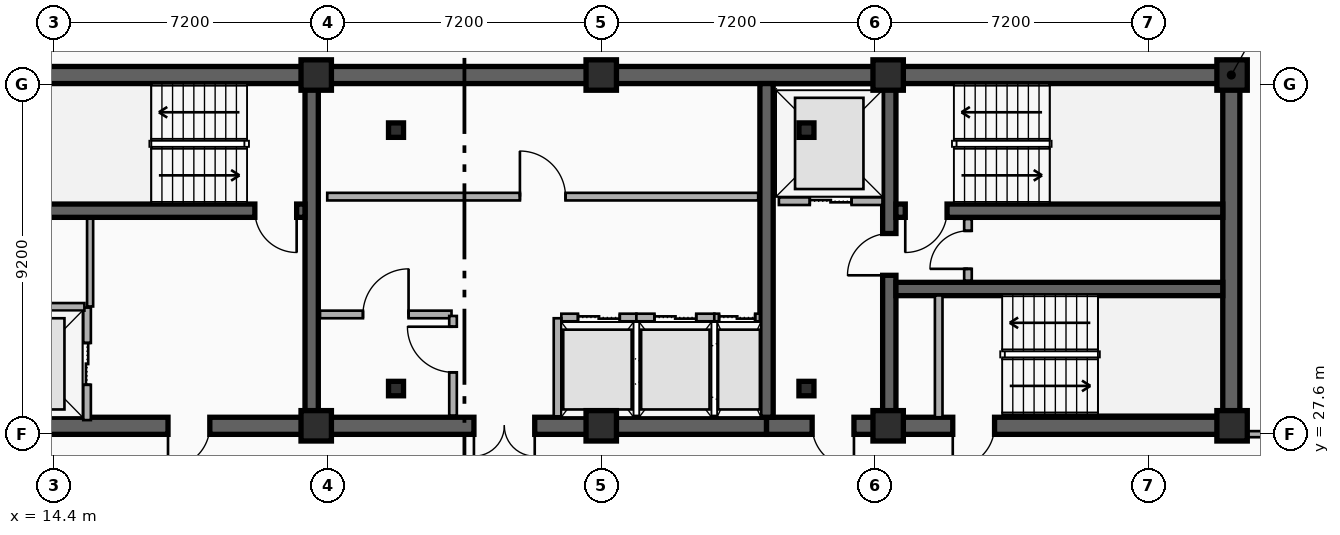
"""IFC4 building model, lengths in metres.
Left out: names, types, materials, properties, quantities, classifications, styles, units other than length and angle.
Written with IfcOpenShell. Run it as: python <this file> out.ifc"""

import sys

from ifc_helpers import new_model, si_unit, direction, frame, frame_2d, origin, origin_2d, place, context, subcontext, project, spatial, rectangle, i_section, extrude, element, fill, save


model = new_model("IFC4")
c1 = context("Model", 3, precision=1e-05, world=origin(), true_north=direction((0.0, 1.0)))
c2 = subcontext(c1, "Body", "Model", "MODEL_VIEW")
j1 = project(units=[si_unit("LENGTHUNIT", "METRE"), si_unit("PLANEANGLEUNIT", "RADIAN")], contexts=[c1])
p1 = place(None, origin())
s1 = spatial("IfcSite", under=j1, at=p1, CompositionType="ELEMENT")
p2 = place(p1, origin())
s2 = spatial("IfcBuilding", under=s1, at=p2, CompositionType="ELEMENT")
p3 = place(p2, frame((0.0, 0.0, 258.4)))
s3 = spatial("IfcBuildingStorey", under=s2, at=p3, CompositionType="ELEMENT", Elevation=258.4)
p4 = place(p3, frame((12.15, 37.05, 0.0), z_axis=(0.0, 0.0, 1.0), x_axis=(1.0, 0.0, 0.0)))
e1 = element("IfcWall", 1, at=p4, inside=s3, PredefinedType="SHEAR", context=c2, shape_type="SweptSolid", body=[
    extrude(rectangle(XDim=33.23, YDim=0.45, at=frame_2d((16.615, 0.0))), origin(), (0.0, 0.0, 1.0), 3.7),
])
p5 = place(p3, frame((21.18, 27.82, 0.0), z_axis=(0.0, 0.0, 1.0), x_axis=(-1.0, 0.0, 0.0)))
e2 = element("IfcWall", 2, at=p5, inside=s3, PredefinedType="SHEAR", context=c2, shape_type="SweptSolid", body=[
    extrude(rectangle(XDim=9.03, YDim=0.45, at=frame_2d((4.515, 0.0))), origin(), (0.0, 0.0, 1.0), 3.7),
])
p6 = place(p5, frame((2.68, 0.0, 0.0)))
e3 = element("IfcOpeningElement", 3, at=p6, cuts=e2, PredefinedType="OPENING", context=c2, shape_type="SweptSolid", body=[
    extrude(rectangle(XDim=1.1, YDim=2.15, at=frame_2d((0.55, 1.075))), frame((0.0, 0.235, 0.0), z_axis=(0.0, -1.0, 0.0), x_axis=(1.0, 0.0, 0.0)), (0.0, 0.0, 1.0), 0.47),
])
p7 = place(p3, frame((33.15, 27.82, 0.0), z_axis=(0.0, 0.0, 1.0), x_axis=(-1.0, 0.0, 0.0)))
e4 = element("IfcWall", 4, at=p7, inside=s3, PredefinedType="SHEAR", context=c2, shape_type="SweptSolid", body=[
    extrude(rectangle(XDim=11.97, YDim=0.45, at=frame_2d((5.985, 0.0))), origin(), (0.0, 0.0, 1.0), 3.7),
])
p8 = place(p7, frame((6.1, 0.0, 0.0)))
e5 = element("IfcOpeningElement", 5, at=p8, cuts=e4, PredefinedType="OPENING", context=c2, shape_type="SweptSolid", body=[
    extrude(rectangle(XDim=1.6, YDim=2.2, at=frame_2d((0.8, 1.1))), frame((0.0, 0.235, 0.0), z_axis=(0.0, -1.0, 0.0), x_axis=(1.0, 0.0, 0.0)), (0.0, 0.0, 1.0), 0.47),
])
p9 = place(p3, frame((45.38, 27.82, 0.0), z_axis=(0.0, 0.0, 1.0), x_axis=(-1.0, 0.0, 0.0)))
e6 = element("IfcWall", 6, at=p9, inside=s3, PredefinedType="SHEAR", context=c2, shape_type="SweptSolid", body=[
    extrude(rectangle(XDim=12.23, YDim=0.45, at=frame_2d((6.115, 0.0))), origin(), (0.0, 0.0, 1.0), 3.7),
])
p10 = place(p9, frame((9.93, 0.0, 0.0)))
e7 = element("IfcOpeningElement", 7, at=p10, cuts=e6, PredefinedType="OPENING", context=c2, shape_type="SweptSolid", body=[
    extrude(rectangle(XDim=1.1, YDim=2.15, at=frame_2d((0.55, 1.075))), frame((0.0, 0.235, 0.0), z_axis=(0.0, -1.0, 0.0), x_axis=(1.0, 0.0, 0.0)), (0.0, 0.0, 1.0), 0.47),
])
p11 = place(p9, frame((6.23, 0.0, 0.0)))
e8 = element("IfcOpeningElement", 8, at=p11, cuts=e6, PredefinedType="OPENING", context=c2, shape_type="SweptSolid", body=[
    extrude(rectangle(XDim=1.1, YDim=2.15, at=frame_2d((0.55, 1.075))), frame((0.0, 0.235, 0.0), z_axis=(0.0, -1.0, 0.0), x_axis=(1.0, 0.0, 0.0)), (0.0, 0.0, 1.0), 0.47),
])
p12 = place(p3, frame((45.38, 28.045, 0.0), z_axis=(0.0, 0.0, 1.0), x_axis=(0.0, 1.0, 0.0)))
e9 = element("IfcWall", 9, at=p12, inside=s3, PredefinedType="SHEAR", context=c2, shape_type="SweptSolid", body=[
    extrude(rectangle(XDim=8.78, YDim=0.45, at=frame_2d((4.39, 0.0))), origin(), (0.0, 0.0, 1.0), 3.7),
])
for number, where, z_axis, x_axis in (
    (10, (21.18, 28.045, 0.0), (0.0, 0.0, 1.0), (0.0, 1.0, 0.0)),
    (11, (33.15, 28.045, 0.0), (0.0, 0.0, 1.0), (0.0, 1.0, 0.0)),
):
    element("IfcWall", number, at=place(p3, frame(where, z_axis=z_axis, x_axis=x_axis)), inside=s3, PredefinedType="SHEAR", context=c2, shape_type="SweptSolid", body=[
        extrude(rectangle(XDim=8.78, YDim=0.35, at=frame_2d((4.39, 0.0))), origin(), (0.0, 0.0, 1.0), 3.7),
    ])
p13 = place(p3, frame((36.38, 28.045, 0.0), z_axis=(0.0, 0.0, 1.0), x_axis=(0.0, 1.0, 0.0)))
e12 = element("IfcWall", 12, at=p13, inside=s3, PredefinedType="SHEAR", context=c2, shape_type="SweptSolid", body=[
    extrude(rectangle(XDim=8.78, YDim=0.35, at=frame_2d((4.39, 0.0))), origin(), (0.0, 0.0, 1.0), 3.7),
])
p14 = place(p13, frame((3.735, 0.0, 0.0)))
e13 = element("IfcOpeningElement", 13, at=p14, cuts=e12, PredefinedType="OPENING", context=c2, shape_type="SweptSolid", body=[
    extrude(rectangle(XDim=1.1, YDim=2.15, at=frame_2d((0.55, 1.075))), frame((0.0, 0.185, 0.0), z_axis=(0.0, -1.0, 0.0), x_axis=(1.0, 0.0, 0.0)), (0.0, 0.0, 1.0), 0.37),
])
p15 = place(p3, frame((21.005, 33.48, 0.0), z_axis=(0.0, 0.0, 1.0), x_axis=(-1.0, 0.0, 0.0)))
e14 = element("IfcWall", 14, at=p15, inside=s3, PredefinedType="SHEAR", context=c2, shape_type="SweptSolid", body=[
    extrude(rectangle(XDim=8.63, YDim=0.35, at=frame_2d((4.315, 0.0))), origin(), (0.0, 0.0, 1.0), 3.7),
])
p16 = place(p15, frame((0.22, 0.0, 0.0)))
e15 = element("IfcOpeningElement", 15, at=p16, cuts=e14, PredefinedType="OPENING", context=c2, shape_type="SweptSolid", body=[
    extrude(rectangle(XDim=1.1, YDim=2.15, at=frame_2d((0.55, 1.075))), frame((0.0, 0.185, 0.0), z_axis=(0.0, -1.0, 0.0), x_axis=(1.0, 0.0, 0.0)), (0.0, 0.0, 1.0), 0.37),
])
p17 = place(p3, frame((45.155, 33.48, 0.0), z_axis=(0.0, 0.0, 1.0), x_axis=(-1.0, 0.0, 0.0)))
e16 = element("IfcWall", 16, at=p17, inside=s3, PredefinedType="SHEAR", context=c2, shape_type="SweptSolid", body=[
    extrude(rectangle(XDim=8.6, YDim=0.35, at=frame_2d((4.3, 0.0))), origin(), (0.0, 0.0, 1.0), 3.7),
])
p18 = place(p17, frame((7.255, 0.0, 0.0)))
e17 = element("IfcOpeningElement", 17, at=p18, cuts=e16, PredefinedType="OPENING", context=c2, shape_type="SweptSolid", body=[
    extrude(rectangle(XDim=1.1, YDim=2.15, at=frame_2d((0.55, 1.075))), frame((0.0, 0.185, 0.0), z_axis=(0.0, -1.0, 0.0), x_axis=(1.0, 0.0, 0.0)), (0.0, 0.0, 1.0), 0.37),
])
p19 = place(p3, frame((36.555, 31.42, 0.0), z_axis=(0.0, 0.0, 1.0), x_axis=(1.0, 0.0, 0.0)))
e18 = element("IfcWall", 18, at=p19, inside=s3, PredefinedType="SHEAR", context=c2, shape_type="SweptSolid", body=[
    extrude(rectangle(XDim=8.6, YDim=0.35, at=frame_2d((4.3, 0.0))), origin(), (0.0, 0.0, 1.0), 3.7),
])
for number, where, z_axis, x_axis in (
    (19, (23.4, 28.8, 0.0), (0.0, 0.0, 1.0), (1.0, 0.0, 0.0)),
    (20, (34.2, 28.8, 0.0), (0.0, 0.0, 1.0), (1.0, 0.0, 0.0)),
    (21, (34.2, 35.6, 0.0), (0.0, 0.0, 1.0), (1.0, 0.0, 0.0)),
    (22, (23.4, 35.6, 0.0), (0.0, 0.0, 1.0), (1.0, 0.0, 0.0)),
):
    element("IfcColumn", number, at=place(p3, frame(where, z_axis=z_axis, x_axis=x_axis)), inside=s3, PredefinedType="COLUMN", context=c2, shape_type="SweptSolid", body=[
        extrude(i_section(OverallWidth=0.395, OverallDepth=0.38, WebThickness=0.019, FlangeThickness=0.03, FilletRadius=0.015, at=origin_2d()), origin(), (0.0, 0.0, 1.0), 3.7),
    ])
for number, where, z_axis, x_axis in (
    (23, (21.3, 27.82, 0.0), (0.0, 0.0, 1.0), (1.0, 0.0, 0.0)),
    (24, (21.3, 37.05, 0.0), (0.0, 0.0, 1.0), (1.0, 0.0, 0.0)),
    (25, (28.8, 27.82, 0.0), (0.0, 0.0, 1.0), (1.0, 0.0, 0.0)),
    (26, (28.8, 37.05, 0.0), (0.0, 0.0, 1.0), (1.0, 0.0, 0.0)),
    (27, (36.35, 27.82, 0.0), (0.0, 0.0, 1.0), (1.0, 0.0, 0.0)),
    (28, (36.35, 37.05, 0.0), (0.0, 0.0, 1.0), (1.0, 0.0, 0.0)),
    (29, (45.4, 27.82, 0.0), (0.0, 0.0, 1.0), (1.0, 0.0, 0.0)),
    (30, (45.4, 37.05, 0.0), (0.0, 0.0, 1.0), (1.0, 0.0, 0.0)),
):
    element("IfcColumn", number, at=place(p3, frame(where, z_axis=z_axis, x_axis=x_axis)), inside=s3, PredefinedType="COLUMN", context=c2, shape_type="SweptSolid", body=[
        extrude(rectangle(XDim=0.8, YDim=0.8, at=origin_2d()), origin(), (0.0, 0.0, 1.0), 3.7),
    ])
p20 = place(p3, frame((15.27, 27.97, 0.0), z_axis=(0.0, 0.0, 1.0), x_axis=(0.0, 1.0, 0.0)))
e31 = element("IfcWall", 31, at=p20, inside=s3, PredefinedType="PARTITIONING", context=c2, shape_type="SweptSolid", body=[
    extrude(rectangle(XDim=2.96, YDim=0.2, at=frame_2d((1.48, 0.0))), origin(), (0.0, 0.0, 1.0), 2.49),
])
p21 = place(p20, frame((0.93, 0.0, 0.0)))
e32 = element("IfcOpeningElement", 32, at=p21, cuts=e31, PredefinedType="OPENING", context=c2, shape_type="SweptSolid", body=[
    extrude(rectangle(XDim=1.1, YDim=2.15, at=frame_2d((0.55, 1.075))), frame((0.0, 0.11, 0.0), z_axis=(0.0, -1.0, 0.0), x_axis=(1.0, 0.0, 0.0)), (0.0, 0.0, 1.0), 0.22),
])
p22 = place(p3, frame((12.45, 30.95, 0.0), z_axis=(0.0, 0.0, 1.0), x_axis=(1.0, 0.0, 0.0)))
e33 = element("IfcWall", 33, at=p22, inside=s3, PredefinedType="PARTITIONING", context=c2, shape_type="SweptSolid", body=[
    extrude(rectangle(XDim=2.75, YDim=0.2, at=frame_2d((1.375, 0.0))), origin(), (0.0, 0.0, 1.0), 2.49),
])
p23 = place(p3, frame((33.475, 33.73, 0.0), z_axis=(0.0, 0.0, 1.0), x_axis=(1.0, 0.0, 0.0)))
e34 = element("IfcWall", 34, at=p23, inside=s3, PredefinedType="PARTITIONING", context=c2, shape_type="SweptSolid", body=[
    extrude(rectangle(XDim=2.725, YDim=0.2, at=frame_2d((1.362, 0.0))), origin(), (0.0, 0.0, 1.0), 2.49),
])
p24 = place(p23, frame((0.812, 0.0, 0.0)))
e35 = element("IfcOpeningElement", 35, at=p24, cuts=e34, PredefinedType="OPENING", context=c2, shape_type="SweptSolid", body=[
    extrude(rectangle(XDim=1.1, YDim=2.15, at=frame_2d((0.55, 1.075))), frame((0.0, 0.11, 0.0), z_axis=(0.0, -1.0, 0.0), x_axis=(1.0, 0.0, 0.0)), (0.0, 0.0, 1.0), 0.22),
])
p25 = place(p3, frame((27.75, 30.67, 0.0), z_axis=(0.0, 0.0, 1.0), x_axis=(1.0, 0.0, 0.0)))
e36 = element("IfcWall", 36, at=p25, inside=s3, PredefinedType="PARTITIONING", context=c2, shape_type="SweptSolid", body=[
    extrude(rectangle(XDim=1.975, YDim=0.2, at=frame_2d((0.988, 0.0))), origin(), (0.0, 0.0, 1.0), 2.49),
])
p26 = place(p25, frame((0.438, 0.0, 0.0)))
e37 = element("IfcOpeningElement", 37, at=p26, cuts=e36, PredefinedType="OPENING", context=c2, shape_type="SweptSolid", body=[
    extrude(rectangle(XDim=1.1, YDim=2.15, at=frame_2d((0.55, 1.075))), frame((0.0, 0.11, 0.0), z_axis=(0.0, -1.0, 0.0), x_axis=(1.0, 0.0, 0.0)), (0.0, 0.0, 1.0), 0.22),
])
p27 = place(p3, frame((27.65, 28.07, 0.0), z_axis=(0.0, 0.0, 1.0), x_axis=(0.0, 1.0, 0.0)))
e38 = element("IfcWall", 38, at=p27, inside=s3, PredefinedType="PARTITIONING", context=c2, shape_type="SweptSolid", body=[
    extrude(rectangle(XDim=2.58, YDim=0.2, at=frame_2d((1.29, 0.0))), origin(), (0.0, 0.0, 1.0), 2.49),
])
p28 = place(p3, frame((29.725, 30.67, 0.0), z_axis=(0.0, 0.0, 1.0), x_axis=(1.0, 0.0, 0.0)))
e39 = element("IfcWall", 39, at=p28, inside=s3, PredefinedType="PARTITIONING", context=c2, shape_type="SweptSolid", body=[
    extrude(rectangle(XDim=2.05, YDim=0.2, at=frame_2d((1.025, 0.0))), origin(), (0.0, 0.0, 1.0), 2.8),
])
p29 = place(p28, frame((0.475, 0.0, 0.0)))
e40 = element("IfcOpeningElement", 40, at=p29, cuts=e39, PredefinedType="OPENING", context=c2, shape_type="SweptSolid", body=[
    extrude(rectangle(XDim=1.1, YDim=2.15, at=frame_2d((0.55, 1.075))), frame((0.0, 0.11, 0.0), z_axis=(0.0, -1.0, 0.0), x_axis=(1.0, 0.0, 0.0)), (0.0, 0.0, 1.0), 0.22),
])
p30 = place(p3, frame((31.775, 30.67, 0.0), z_axis=(0.0, 0.0, 1.0), x_axis=(1.0, 0.0, 0.0)))
e41 = element("IfcWall", 41, at=p30, inside=s3, PredefinedType="PARTITIONING", context=c2, shape_type="SweptSolid", body=[
    extrude(rectangle(XDim=1.2, YDim=0.2, at=frame_2d((0.6, 0.0))), origin(), (0.0, 0.0, 1.0), 2.8),
])
p31 = place(p30, frame((0.125, 0.0, 0.0)))
e42 = element("IfcOpeningElement", 42, at=p31, cuts=e41, PredefinedType="OPENING", context=c2, shape_type="SweptSolid", body=[
    extrude(rectangle(XDim=0.95, YDim=2.15, at=frame_2d((0.475, 1.075))), frame((0.0, 0.11, 0.0), z_axis=(0.0, -1.0, 0.0), x_axis=(1.0, 0.0, 0.0)), (0.0, 0.0, 1.0), 0.22),
])
p32 = place(p3, frame((37.68, 28.045, 0.0), z_axis=(0.0, 0.0, 1.0), x_axis=(0.0, 1.0, 0.0)))
e43 = element("IfcWall", 43, at=p32, inside=s3, PredefinedType="PARTITIONING", context=c2, shape_type="SweptSolid", body=[
    extrude(rectangle(XDim=3.205, YDim=0.2, at=frame_2d((1.603, 0.0))), origin(), (0.0, 0.0, 1.0), 2.8),
])
p33 = place(p3, frame((38.45, 31.64, 0.0), z_axis=(0.0, 0.0, 1.0), x_axis=(0.0, 1.0, 0.0)))
e44 = element("IfcWall", 44, at=p33, inside=s3, PredefinedType="PARTITIONING", context=c2, shape_type="SweptSolid", body=[
    extrude(rectangle(XDim=1.62, YDim=0.2, at=frame_2d((0.81, 0.0))), origin(), (0.0, 0.0, 1.0), 3.42),
])
p34 = place(p33, frame((0.31, 0.0, 0.0)))
e45 = element("IfcOpeningElement", 45, at=p34, cuts=e44, PredefinedType="OPENING", context=c2, shape_type="SweptSolid", body=[
    extrude(rectangle(XDim=1.0, YDim=2.15, at=frame_2d((0.5, 1.075))), frame((0.0, 0.11, 0.0), z_axis=(0.0, -1.0, 0.0), x_axis=(1.0, 0.0, 0.0)), (0.0, 0.0, 1.0), 0.22),
])
p35 = place(p3, frame((21.4, 30.75, 0.0), z_axis=(0.0, 0.0, 1.0), x_axis=(1.0, 0.0, 0.0)))
e46 = element("IfcWall", 46, at=p35, inside=s3, PredefinedType="PARTITIONING", context=c2, shape_type="SweptSolid", body=[
    extrude(rectangle(XDim=3.46, YDim=0.2, at=frame_2d((1.73, 0.0))), origin(), (0.0, 0.0, 1.0), 2.49),
])
p36 = place(p35, frame((1.13, 0.0, 0.0)))
e47 = element("IfcOpeningElement", 47, at=p36, cuts=e46, PredefinedType="OPENING", context=c2, shape_type="SweptSolid", body=[
    extrude(rectangle(XDim=1.2, YDim=2.15, at=frame_2d((0.6, 1.075))), frame((0.0, 0.11, 0.0), z_axis=(0.0, -1.0, 0.0), x_axis=(1.0, 0.0, 0.0)), (0.0, 0.0, 1.0), 0.22),
])
p37 = place(p3, frame((21.59, 33.85, 0.0), z_axis=(0.0, 0.0, 1.0), x_axis=(1.0, 0.0, 0.0)))
e48 = element("IfcWall", 48, at=p37, inside=s3, PredefinedType="PARTITIONING", context=c2, shape_type="SweptSolid", body=[
    extrude(rectangle(XDim=11.34, YDim=0.2, at=frame_2d((5.67, 0.0))), origin(), (0.0, 0.0, 1.0), 2.49),
])
p38 = place(p37, frame((5.07, 0.0, 0.0)))
e49 = element("IfcOpeningElement", 49, at=p38, cuts=e48, PredefinedType="OPENING", context=c2, shape_type="SweptSolid", body=[
    extrude(rectangle(XDim=1.2, YDim=2.15, at=frame_2d((0.6, 1.075))), frame((0.0, 0.11, 0.0), z_axis=(0.0, -1.0, 0.0), x_axis=(1.0, 0.0, 0.0)), (0.0, 0.0, 1.0), 0.22),
])
p39 = place(p3, frame((24.9, 28.09, 0.0), z_axis=(0.0, 0.0, 1.0), x_axis=(0.0, 1.0, 0.0)))
e50 = element("IfcWall", 50, at=p39, inside=s3, PredefinedType="PARTITIONING", context=c2, shape_type="SweptSolid", body=[
    extrude(rectangle(XDim=2.62, YDim=0.2, at=frame_2d((1.31, 0.0))), origin(), (0.0, 0.0, 1.0), 2.8),
])
p40 = place(p39, frame((1.137, 0.0, 0.0)))
e51 = element("IfcOpeningElement", 51, at=p40, cuts=e50, PredefinedType="OPENING", context=c2, shape_type="SweptSolid", body=[
    extrude(rectangle(XDim=1.2, YDim=2.15, at=frame_2d((0.6, 1.075))), frame((0.0, 0.11, 0.0), z_axis=(0.0, -1.0, 0.0), x_axis=(1.0, 0.0, 0.0)), (0.0, 0.0, 1.0), 0.22),
])
p41 = place(p3, frame((15.35, 30.96, 0.0), z_axis=(0.0, 0.0, 1.0), x_axis=(0.0, 1.0, 0.0)))
e52 = element("IfcWall", 52, at=p41, inside=s3, PredefinedType="PARTITIONING", context=c2, shape_type="SweptSolid", body=[
    extrude(rectangle(XDim=2.31, YDim=0.16, at=frame_2d((1.155, 0.0))), origin(), (0.0, 0.0, 1.0), 3.42),
])
p42 = place(p3, frame((45.41, 27.6, 0.0), z_axis=(0.0, 0.0, 1.0), x_axis=(1.0, 0.0, 0.0)))
e53 = element("IfcWall", 53, at=p42, inside=s3, PredefinedType="PARTITIONING", context=c2, shape_type="SweptSolid", body=[
    extrude(rectangle(XDim=0.91, YDim=0.16, at=frame_2d((0.455, 0.0))), origin(), (0.0, 0.0, 1.0), 2.49),
])
p43 = place(p21, origin())
e54 = element("IfcDoor", 54, at=p43, inside=s3, OperationType="DOUBLE_DOOR_SLIDING", PredefinedType="DOOR", context=c2, shape_type="SweptSolid", body=[
    extrude(rectangle(XDim=1.1, YDim=2.15, at=frame_2d((0.55, 1.075))), frame((0.0, 0.025, 0.0), z_axis=(0.0, -1.0, 0.0), x_axis=(1.0, 0.0, 0.0)), (0.0, 0.0, 1.0), 0.05),
])
fill(e32, e54)
p44 = place(p24, origin())
e55 = element("IfcDoor", 55, at=p44, inside=s3, OperationType="DOUBLE_DOOR_SLIDING", PredefinedType="DOOR", context=c2, shape_type="SweptSolid", body=[
    extrude(rectangle(XDim=1.1, YDim=2.15, at=frame_2d((0.55, 1.075))), frame((0.0, 0.025, 0.0), z_axis=(0.0, -1.0, 0.0), x_axis=(1.0, 0.0, 0.0)), (0.0, 0.0, 1.0), 0.05),
])
fill(e35, e55)
p45 = place(p26, origin())
e56 = element("IfcDoor", 56, at=p45, inside=s3, OperationType="DOUBLE_DOOR_SLIDING", PredefinedType="DOOR", context=c2, shape_type="SweptSolid", body=[
    extrude(rectangle(XDim=1.1, YDim=2.15, at=frame_2d((0.55, 1.075))), frame((0.0, 0.025, 0.0), z_axis=(0.0, -1.0, 0.0), x_axis=(1.0, 0.0, 0.0)), (0.0, 0.0, 1.0), 0.05),
])
fill(e37, e56)
p46 = place(p29, origin())
e57 = element("IfcDoor", 57, at=p46, inside=s3, OperationType="DOUBLE_DOOR_SLIDING", PredefinedType="DOOR", context=c2, shape_type="SweptSolid", body=[
    extrude(rectangle(XDim=1.1, YDim=2.15, at=frame_2d((0.55, 1.075))), frame((0.0, 0.025, 0.0), z_axis=(0.0, -1.0, 0.0), x_axis=(1.0, 0.0, 0.0)), (0.0, 0.0, 1.0), 0.05),
])
fill(e40, e57)
p47 = place(p31, origin())
e58 = element("IfcDoor", 58, at=p47, inside=s3, OperationType="DOUBLE_DOOR_SLIDING", PredefinedType="DOOR", context=c2, shape_type="SweptSolid", body=[
    extrude(rectangle(XDim=0.95, YDim=2.15, at=frame_2d((0.475, 1.075))), frame((0.0, 0.025, 0.0), z_axis=(0.0, -1.0, 0.0), x_axis=(1.0, 0.0, 0.0)), (0.0, 0.0, 1.0), 0.05),
])
fill(e42, e58)
p48 = place(p16, origin())
e59 = element("IfcDoor", 59, at=p48, inside=s3, OperationType="SINGLE_SWING_LEFT", PredefinedType="DOOR", context=c2, shape_type="SweptSolid", body=[
    extrude(rectangle(XDim=1.1, YDim=2.15, at=frame_2d((0.55, 1.075))), frame((0.0, 0.025, 0.0), z_axis=(0.0, -1.0, 0.0), x_axis=(1.0, 0.0, 0.0)), (0.0, 0.0, 1.0), 0.05),
])
fill(e15, e59)
p49 = place(p6, origin())
e60 = element("IfcDoor", 60, at=p49, inside=s3, OperationType="SINGLE_SWING_RIGHT", PredefinedType="DOOR", context=c2, shape_type="SweptSolid", body=[
    extrude(rectangle(XDim=1.1, YDim=2.15, at=frame_2d((0.55, 1.075))), frame((0.0, 0.025, 0.0), z_axis=(0.0, -1.0, 0.0), x_axis=(1.0, 0.0, 0.0)), (0.0, 0.0, 1.0), 0.05),
])
fill(e3, e60)
p50 = place(p18, origin())
e61 = element("IfcDoor", 61, at=p50, inside=s3, OperationType="SINGLE_SWING_RIGHT", PredefinedType="DOOR", context=c2, shape_type="SweptSolid", body=[
    extrude(rectangle(XDim=1.1, YDim=2.15, at=frame_2d((0.55, 1.075))), frame((0.0, 0.025, 0.0), z_axis=(0.0, -1.0, 0.0), x_axis=(1.0, 0.0, 0.0)), (0.0, 0.0, 1.0), 0.05),
])
fill(e17, e61)
p51 = place(p14, origin())
e62 = element("IfcDoor", 62, at=p51, inside=s3, OperationType="SINGLE_SWING_LEFT", PredefinedType="DOOR", context=c2, shape_type="SweptSolid", body=[
    extrude(rectangle(XDim=1.1, YDim=2.15, at=frame_2d((0.55, 1.075))), frame((0.0, 0.025, 0.0), z_axis=(0.0, -1.0, 0.0), x_axis=(1.0, 0.0, 0.0)), (0.0, 0.0, 1.0), 0.05),
])
fill(e13, e62)
p52 = place(p10, origin())
e63 = element("IfcDoor", 63, at=p52, inside=s3, OperationType="SINGLE_SWING_LEFT", PredefinedType="DOOR", context=c2, shape_type="SweptSolid", body=[
    extrude(rectangle(XDim=1.1, YDim=2.15, at=frame_2d((0.55, 1.075))), frame((0.0, 0.025, 0.0), z_axis=(0.0, -1.0, 0.0), x_axis=(1.0, 0.0, 0.0)), (0.0, 0.0, 1.0), 0.05),
])
fill(e7, e63)
p53 = place(p11, origin())
e64 = element("IfcDoor", 64, at=p53, inside=s3, OperationType="SINGLE_SWING_RIGHT", PredefinedType="DOOR", context=c2, shape_type="SweptSolid", body=[
    extrude(rectangle(XDim=1.1, YDim=2.15, at=frame_2d((0.55, 1.075))), frame((0.0, 0.025, 0.0), z_axis=(0.0, -1.0, 0.0), x_axis=(1.0, 0.0, 0.0)), (0.0, 0.0, 1.0), 0.05),
])
fill(e8, e64)
p54 = place(p8, origin())
e65 = element("IfcDoor", 65, at=p54, inside=s3, OperationType="SINGLE_SWING_LEFT", PredefinedType="DOOR", context=c2, shape_type="SweptSolid", body=[
    extrude(rectangle(XDim=1.6, YDim=2.2, at=frame_2d((0.8, 1.1))), frame((0.0, 0.025, 0.0), z_axis=(0.0, -1.0, 0.0), x_axis=(1.0, 0.0, 0.0)), (0.0, 0.0, 1.0), 0.05),
])
fill(e5, e65)
p55 = place(p34, origin())
e66 = element("IfcDoor", 66, at=p55, inside=s3, OperationType="SINGLE_SWING_LEFT", PredefinedType="DOOR", context=c2, shape_type="SweptSolid", body=[
    extrude(rectangle(XDim=1.0, YDim=2.15, at=frame_2d((0.5, 1.075))), frame((0.0, 0.025, 0.0), z_axis=(0.0, -1.0, 0.0), x_axis=(1.0, 0.0, 0.0)), (0.0, 0.0, 1.0), 0.05),
])
fill(e45, e66)
p56 = place(p36, origin())
e67 = element("IfcDoor", 67, at=p56, inside=s3, OperationType="SINGLE_SWING_RIGHT", PredefinedType="DOOR", context=c2, shape_type="SweptSolid", body=[
    extrude(rectangle(XDim=1.2, YDim=2.15, at=frame_2d((0.6, 1.075))), frame((0.0, 0.025, 0.0), z_axis=(0.0, -1.0, 0.0), x_axis=(1.0, 0.0, 0.0)), (0.0, 0.0, 1.0), 0.05),
])
fill(e47, e67)
p57 = place(p38, origin())
e68 = element("IfcDoor", 68, at=p57, inside=s3, OperationType="SINGLE_SWING_LEFT", PredefinedType="DOOR", context=c2, shape_type="SweptSolid", body=[
    extrude(rectangle(XDim=1.2, YDim=2.15, at=frame_2d((0.6, 1.075))), frame((0.0, 0.025, 0.0), z_axis=(0.0, -1.0, 0.0), x_axis=(1.0, 0.0, 0.0)), (0.0, 0.0, 1.0), 0.05),
])
fill(e49, e68)
p58 = place(p40, origin())
e69 = element("IfcDoor", 69, at=p58, inside=s3, OperationType="SINGLE_SWING_RIGHT", PredefinedType="DOOR", context=c2, shape_type="SweptSolid", body=[
    extrude(rectangle(XDim=1.2, YDim=2.15, at=frame_2d((0.6, 1.075))), frame((0.0, 0.025, 0.0), z_axis=(0.0, -1.0, 0.0), x_axis=(1.0, 0.0, 0.0)), (0.0, 0.0, 1.0), 0.05),
])
fill(e51, e69)
save(model, sys.argv[1])
